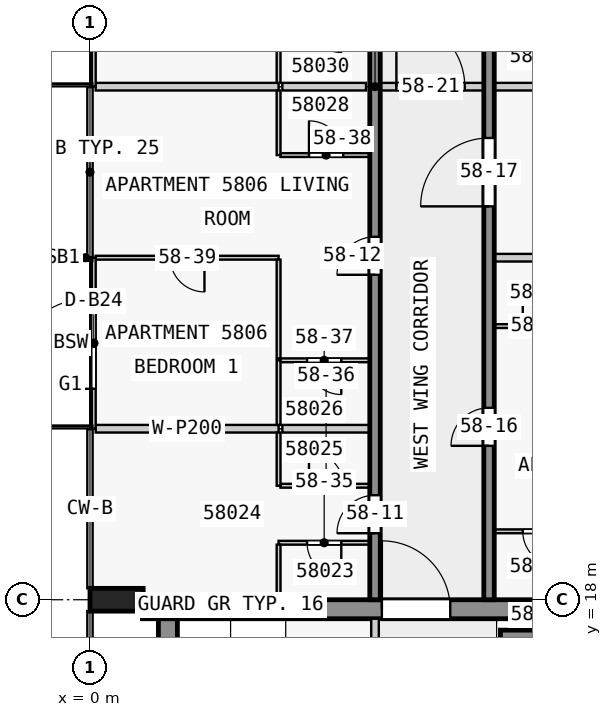
"""IFC4 building model, lengths in metres.
Left out: names, types, materials, properties, quantities, classifications, styles, units other than length and angle.
Written with IfcOpenShell. Run it as: python <this file> out.ifc"""

import sys

from ifc_helpers import new_model, si_unit, direction, frame, frame_2d, origin, origin_2d, place, context, subcontext, project, spatial, rectangle, extrude, element, fill, save


model = new_model("IFC4")
c1 = context("Model", 3, precision=1e-05, world=origin(), true_north=direction((0.0, 1.0)))
c2 = subcontext(c1, "Body", "Model", "MODEL_VIEW")
j1 = project(units=[si_unit("LENGTHUNIT", "METRE"), si_unit("PLANEANGLEUNIT", "RADIAN")], contexts=[c1])
p1 = place(None, origin())
s1 = spatial("IfcSite", under=j1, at=p1, CompositionType="ELEMENT")
p2 = place(p1, origin())
s2 = spatial("IfcBuilding", under=s1, at=p2, CompositionType="ELEMENT")
p3 = place(p2, frame((0.0, 0.0, 222.4)))
s3 = spatial("IfcBuildingStorey", under=s2, at=p3, CompositionType="ELEMENT", Elevation=222.4)
p4 = place(p3, frame((0.7, 18.0, 0.0), z_axis=(0.0, 0.0, 1.0), x_axis=(0.0, 1.0, 0.0)))
e1 = element("IfcColumn", 1, at=p4, inside=s3, PredefinedType="COLUMN", context=c2, shape_type="SweptSolid", body=[
    extrude(rectangle(XDim=0.6, YDim=1.4, at=origin_2d()), origin(), (0.0, 0.0, 1.0), 3.5),
])
p5 = place(p3, frame((1.38, 17.75, 0.0), z_axis=(0.0, 0.0, 1.0), x_axis=(1.0, 0.0, 0.0)))
e2 = element("IfcWall", 2, at=p5, inside=s3, PredefinedType="SHEAR", context=c2, shape_type="SweptSolid", body=[
    extrude(rectangle(XDim=21.12, YDim=0.5, at=frame_2d((10.56, 0.0))), origin(), (0.0, 0.0, 1.0), 3.25),
])
p6 = place(p5, frame((6.3, 0.0, 0.0)))
e3 = element("IfcOpeningElement", 3, at=p6, cuts=e2, PredefinedType="OPENING", context=c2, shape_type="SweptSolid", body=[
    extrude(rectangle(XDim=1.8, YDim=2.1, at=frame_2d((0.9, 1.05))), frame((0.0, 0.26, 0.0), z_axis=(0.0, -1.0, 0.0), x_axis=(1.0, 0.0, 0.0)), (0.0, 0.0, 1.0), 0.52),
])
p7 = place(p3, frame((2.05, 2.5, 0.0), z_axis=(0.0, 0.0, 1.0), x_axis=(0.0, 1.0, 0.0)))
e4 = element("IfcWall", 4, at=p7, inside=s3, PredefinedType="SHEAR", context=c2, shape_type="SweptSolid", body=[
    extrude(rectangle(XDim=15.0, YDim=0.5, at=frame_2d((7.5, 0.0))), origin(), (0.0, 0.0, 1.0), 3.25),
])
p8 = place(p3, frame((10.8, 17.05, 0.0), z_axis=(0.0, 0.0, 1.0), x_axis=(1.0, 0.0, 0.0)))
e5 = element("IfcWall", 5, at=p8, inside=s3, PredefinedType="SHEAR", context=c2, shape_type="SweptSolid", body=[
    extrude(rectangle(XDim=7.8, YDim=0.3, at=frame_2d((3.9, 0.0))), origin(), (0.0, 0.0, 1.0), 3.25),
])
p9 = place(p3, frame((7.5, 18.0, 0.0), z_axis=(0.0, 0.0, 1.0), x_axis=(0.0, 1.0, 0.0)))
e6 = element("IfcWall", 6, at=p9, inside=s3, PredefinedType="SHEAR", context=c2, shape_type="SweptSolid", body=[
    extrude(rectangle(XDim=27.0, YDim=0.275, at=frame_2d((13.5, 0.0))), origin(), (0.0, 0.0, 1.0), 3.25),
])
p10 = place(p9, frame((1.75, 0.0, 0.0)))
e7 = element("IfcOpeningElement", 7, at=p10, cuts=e6, PredefinedType="OPENING", context=c2, shape_type="SweptSolid", body=[
    extrude(rectangle(XDim=1.0, YDim=2.1, at=frame_2d((0.5, 1.05))), frame((0.0, 0.147, 0.0), z_axis=(0.0, -1.0, 0.0), x_axis=(1.0, 0.0, 0.0)), (0.0, 0.0, 1.0), 0.295),
])
p11 = place(p9, frame((8.55, 0.0, 0.0)))
e8 = element("IfcOpeningElement", 8, at=p11, cuts=e6, PredefinedType="OPENING", context=c2, shape_type="SweptSolid", body=[
    extrude(rectangle(XDim=1.0, YDim=2.1, at=frame_2d((0.5, 1.05))), frame((0.0, 0.147, 0.0), z_axis=(0.0, -1.0, 0.0), x_axis=(1.0, 0.0, 0.0)), (0.0, 0.0, 1.0), 0.295),
])
p12 = place(p9, frame((17.55, 0.0, 0.0)))
e9 = element("IfcOpeningElement", 9, at=p12, cuts=e6, PredefinedType="OPENING", context=c2, shape_type="SweptSolid", body=[
    extrude(rectangle(XDim=1.0, YDim=2.1, at=frame_2d((0.5, 1.05))), frame((0.0, 0.147, 0.0), z_axis=(0.0, -1.0, 0.0), x_axis=(1.0, 0.0, 0.0)), (0.0, 0.0, 1.0), 0.295),
])
p13 = place(p9, frame((23.25, 0.0, 0.0)))
e10 = element("IfcOpeningElement", 10, at=p13, cuts=e6, PredefinedType="OPENING", context=c2, shape_type="SweptSolid", body=[
    extrude(rectangle(XDim=0.9, YDim=2.1, at=frame_2d((0.45, 1.05))), frame((0.0, 0.147, 0.0), z_axis=(0.0, -1.0, 0.0), x_axis=(1.0, 0.0, 0.0)), (0.0, 0.0, 1.0), 0.295),
])
p14 = place(p9, frame((25.45, 0.0, 0.0)))
e11 = element("IfcOpeningElement", 11, at=p14, cuts=e6, PredefinedType="OPENING", context=c2, shape_type="SweptSolid", body=[
    extrude(rectangle(XDim=1.0, YDim=2.1, at=frame_2d((0.5, 1.05))), frame((0.0, 0.147, 0.0), z_axis=(0.0, -1.0, 0.0), x_axis=(1.0, 0.0, 0.0)), (0.0, 0.0, 1.0), 0.295),
])
p15 = place(p3, frame((10.5, 18.0, 0.0), z_axis=(0.0, 0.0, 1.0), x_axis=(0.0, 1.0, 0.0)))
e12 = element("IfcWall", 12, at=p15, inside=s3, PredefinedType="SHEAR", context=c2, shape_type="SweptSolid", body=[
    extrude(rectangle(XDim=27.0, YDim=0.275, at=frame_2d((13.5, 0.0))), origin(), (0.0, 0.0, 1.0), 3.25),
])
p16 = place(p15, frame((4.05, 0.0, 0.0)))
e13 = element("IfcOpeningElement", 13, at=p16, cuts=e12, PredefinedType="OPENING", context=c2, shape_type="SweptSolid", body=[
    extrude(rectangle(XDim=1.0, YDim=2.1, at=frame_2d((0.5, 1.05))), frame((0.0, 0.147, 0.0), z_axis=(0.0, -1.0, 0.0), x_axis=(1.0, 0.0, 0.0)), (0.0, 0.0, 1.0), 0.295),
])
p17 = place(p15, frame((10.35, 0.0, 0.0)))
e14 = element("IfcOpeningElement", 14, at=p17, cuts=e12, PredefinedType="OPENING", context=c2, shape_type="SweptSolid", body=[
    extrude(rectangle(XDim=1.8, YDim=2.1, at=frame_2d((0.9, 1.05))), frame((0.0, 0.147, 0.0), z_axis=(0.0, -1.0, 0.0), x_axis=(1.0, 0.0, 0.0)), (0.0, 0.0, 1.0), 0.295),
])
p18 = place(p15, frame((15.25, 0.0, 0.0)))
e15 = element("IfcOpeningElement", 15, at=p18, cuts=e12, PredefinedType="OPENING", context=c2, shape_type="SweptSolid", body=[
    extrude(rectangle(XDim=1.0, YDim=2.1, at=frame_2d((0.5, 1.05))), frame((0.0, 0.147, 0.0), z_axis=(0.0, -1.0, 0.0), x_axis=(1.0, 0.0, 0.0)), (0.0, 0.0, 1.0), 0.295),
])
p19 = place(p15, frame((21.35, 0.0, 0.0)))
e16 = element("IfcOpeningElement", 16, at=p19, cuts=e12, PredefinedType="OPENING", context=c2, shape_type="SweptSolid", body=[
    extrude(rectangle(XDim=1.0, YDim=2.1, at=frame_2d((0.5, 1.05))), frame((0.0, 0.147, 0.0), z_axis=(0.0, -1.0, 0.0), x_axis=(1.0, 0.0, 0.0)), (0.0, 0.0, 1.0), 0.295),
])
p20 = place(p3, frame((0.1, 22.5, 0.0), z_axis=(0.0, 0.0, 1.0), x_axis=(0.0, 1.0, 0.0)))
e17 = element("IfcWall", 17, at=p20, inside=s3, PredefinedType="STANDARD", context=c2, shape_type="SweptSolid", body=[
    extrude(rectangle(XDim=4.5, YDim=0.1, at=frame_2d((2.25, 0.0))), origin(), (0.0, 0.0, 1.0), 3.25),
])
p21 = place(p20, frame((1.05, 0.0, 0.0)))
e18 = element("IfcOpeningElement", 18, at=p21, cuts=e17, PredefinedType="OPENING", context=c2, shape_type="SweptSolid", body=[
    extrude(rectangle(XDim=2.4, YDim=2.4, at=frame_2d((1.2, 1.2))), frame((0.0, 0.06, 0.0), z_axis=(0.0, -1.0, 0.0), x_axis=(1.0, 0.0, 0.0)), (0.0, 0.0, 1.0), 0.12),
])
p22 = place(p3, frame((0.1, 31.5, 0.0), z_axis=(0.0, 0.0, 1.0), x_axis=(0.0, 1.0, 0.0)))
e19 = element("IfcWall", 19, at=p22, inside=s3, PredefinedType="STANDARD", context=c2, shape_type="SweptSolid", body=[
    extrude(rectangle(XDim=4.5, YDim=0.1, at=frame_2d((2.25, 0.0))), origin(), (0.0, 0.0, 1.0), 3.25),
])
p23 = place(p22, frame((1.05, 0.0, 0.0)))
e20 = element("IfcOpeningElement", 20, at=p23, cuts=e19, PredefinedType="OPENING", context=c2, shape_type="SweptSolid", body=[
    extrude(rectangle(XDim=2.4, YDim=2.4, at=frame_2d((1.2, 1.2))), frame((0.0, 0.06, 0.0), z_axis=(0.0, -1.0, 0.0), x_axis=(1.0, 0.0, 0.0)), (0.0, 0.0, 1.0), 0.12),
])
p24 = place(p3, frame((7.5, 10.1, 0.0), z_axis=(0.0, 0.0, 1.0), x_axis=(0.0, 1.0, 0.0)))
e21 = element("IfcWall", 21, at=p24, inside=s3, PredefinedType="PARTITIONING", context=c2, shape_type="SweptSolid", body=[
    extrude(rectangle(XDim=7.4, YDim=0.2, at=frame_2d((3.7, 0.0))), origin(), (0.0, 0.0, 1.0), 3.25),
])
p25 = place(p24, frame((0.75, 0.0, 0.0)))
e22 = element("IfcOpeningElement", 22, at=p25, cuts=e21, PredefinedType="OPENING", context=c2, shape_type="SweptSolid", body=[
    extrude(rectangle(XDim=0.9, YDim=2.1, at=frame_2d((0.45, 1.05))), frame((0.0, 0.11, 0.0), z_axis=(0.0, -1.0, 0.0), x_axis=(1.0, 0.0, 0.0)), (0.0, 0.0, 1.0), 0.22),
])
p26 = place(p24, frame((3.175, 0.0, 0.0)))
e23 = element("IfcOpeningElement", 23, at=p26, cuts=e21, PredefinedType="OPENING", context=c2, shape_type="SweptSolid", body=[
    extrude(rectangle(XDim=0.9, YDim=2.1, at=frame_2d((0.45, 1.05))), frame((0.0, 0.11, 0.0), z_axis=(0.0, -1.0, 0.0), x_axis=(1.0, 0.0, 0.0)), (0.0, 0.0, 1.0), 0.22),
])
p27 = place(p24, frame((5.25, 0.0, 0.0)))
e24 = element("IfcOpeningElement", 24, at=p27, cuts=e21, PredefinedType="OPENING", context=c2, shape_type="SweptSolid", body=[
    extrude(rectangle(XDim=0.9, YDim=2.1, at=frame_2d((0.45, 1.05))), frame((0.0, 0.11, 0.0), z_axis=(0.0, -1.0, 0.0), x_axis=(1.0, 0.0, 0.0)), (0.0, 0.0, 1.0), 0.22),
])
p28 = place(p3, frame((7.363, 19.5, 0.0), z_axis=(0.0, 0.0, 1.0), x_axis=(-1.0, 0.0, 0.0)))
e25 = element("IfcWall", 25, at=p28, inside=s3, PredefinedType="PARTITIONING", context=c2, shape_type="SweptSolid", body=[
    extrude(rectangle(XDim=2.4, YDim=0.1, at=frame_2d((1.2, 0.0))), origin(), (0.0, 0.0, 1.0), 3.25),
])
p29 = place(p28, frame((0.75, 0.0, 0.0)))
e26 = element("IfcOpeningElement", 26, at=p29, cuts=e25, PredefinedType="OPENING", context=c2, shape_type="SweptSolid", body=[
    extrude(rectangle(XDim=0.9, YDim=2.1, at=frame_2d((0.45, 1.05))), frame((0.0, 0.06, 0.0), z_axis=(0.0, -1.0, 0.0), x_axis=(1.0, 0.0, 0.0)), (0.0, 0.0, 1.0), 0.12),
])
p30 = place(p3, frame((13.038, 19.8, 0.0), z_axis=(0.0, 0.0, 1.0), x_axis=(-1.0, 0.0, 0.0)))
e27 = element("IfcWall", 27, at=p30, inside=s3, PredefinedType="PARTITIONING", context=c2, shape_type="SweptSolid", body=[
    extrude(rectangle(XDim=2.4, YDim=0.1, at=frame_2d((1.2, 0.0))), origin(), (0.0, 0.0, 1.0), 3.25),
])
p31 = place(p30, frame((0.75, 0.0, 0.0)))
e28 = element("IfcOpeningElement", 28, at=p31, cuts=e27, PredefinedType="OPENING", context=c2, shape_type="SweptSolid", body=[
    extrude(rectangle(XDim=0.9, YDim=2.1, at=frame_2d((0.45, 1.05))), frame((0.0, 0.06, 0.0), z_axis=(0.0, -1.0, 0.0), x_axis=(1.0, 0.0, 0.0)), (0.0, 0.0, 1.0), 0.12),
])
p32 = place(p3, frame((5.012, 21.0, 0.0), z_axis=(0.0, 0.0, 1.0), x_axis=(1.0, 0.0, 0.0)))
e29 = element("IfcWall", 29, at=p32, inside=s3, PredefinedType="PARTITIONING", context=c2, shape_type="SweptSolid", body=[
    extrude(rectangle(XDim=2.35, YDim=0.1, at=frame_2d((1.175, 0.0))), origin(), (0.0, 0.0, 1.0), 3.25),
])
p33 = place(p32, frame((0.75, 0.0, 0.0)))
e30 = element("IfcOpeningElement", 30, at=p33, cuts=e29, PredefinedType="OPENING", context=c2, shape_type="SweptSolid", body=[
    extrude(rectangle(XDim=0.9, YDim=2.1, at=frame_2d((0.45, 1.05))), frame((0.0, 0.06, 0.0), z_axis=(0.0, -1.0, 0.0), x_axis=(1.0, 0.0, 0.0)), (0.0, 0.0, 1.0), 0.12),
])
p34 = place(p3, frame((7.363, 22.5, 0.0), z_axis=(0.0, 0.0, 1.0), x_axis=(-1.0, 0.0, 0.0)))
e31 = element("IfcWall", 31, at=p34, inside=s3, PredefinedType="PARTITIONING", context=c2, shape_type="SweptSolid", body=[
    extrude(rectangle(XDim=2.3, YDim=0.2, at=frame_2d((1.15, 0.0))), origin(), (0.0, 0.0, 1.0), 3.25),
])
p35 = place(p3, frame((0.15, 22.5, 0.0), z_axis=(0.0, 0.0, 1.0), x_axis=(1.0, 0.0, 0.0)))
e32 = element("IfcWall", 32, at=p35, inside=s3, PredefinedType="PARTITIONING", context=c2, shape_type="SweptSolid", body=[
    extrude(rectangle(XDim=4.812, YDim=0.2, at=frame_2d((2.406, 0.0))), origin(), (0.0, 0.0, 1.0), 3.25),
])
p36 = place(p3, frame((7.363, 24.3, 0.0), z_axis=(0.0, 0.0, 1.0), x_axis=(-1.0, 0.0, 0.0)))
e33 = element("IfcWall", 33, at=p36, inside=s3, PredefinedType="PARTITIONING", context=c2, shape_type="SweptSolid", body=[
    extrude(rectangle(XDim=2.35, YDim=0.1, at=frame_2d((1.175, 0.0))), origin(), (0.0, 0.0, 1.0), 3.25),
])
p37 = place(p36, frame((0.75, 0.0, 0.0)))
e34 = element("IfcOpeningElement", 34, at=p37, cuts=e33, PredefinedType="OPENING", context=c2, shape_type="SweptSolid", body=[
    extrude(rectangle(XDim=0.9, YDim=2.1, at=frame_2d((0.45, 1.05))), frame((0.0, 0.06, 0.0), z_axis=(0.0, -1.0, 0.0), x_axis=(1.0, 0.0, 0.0)), (0.0, 0.0, 1.0), 0.12),
])
p38 = place(p3, frame((10.637, 25.2, 0.0), z_axis=(0.0, 0.0, 1.0), x_axis=(1.0, 0.0, 0.0)))
e35 = element("IfcWall", 35, at=p38, inside=s3, PredefinedType="PARTITIONING", context=c2, shape_type="SweptSolid", body=[
    extrude(rectangle(XDim=2.35, YDim=0.1, at=frame_2d((1.175, 0.0))), origin(), (0.0, 0.0, 1.0), 3.25),
])
p39 = place(p38, frame((0.75, 0.0, 0.0)))
e36 = element("IfcOpeningElement", 36, at=p39, cuts=e35, PredefinedType="OPENING", context=c2, shape_type="SweptSolid", body=[
    extrude(rectangle(XDim=0.9, YDim=2.1, at=frame_2d((0.45, 1.05))), frame((0.0, 0.06, 0.0), z_axis=(0.0, -1.0, 0.0), x_axis=(1.0, 0.0, 0.0)), (0.0, 0.0, 1.0), 0.12),
])
p40 = place(p3, frame((4.962, 27.0, 0.0), z_axis=(0.0, 0.0, 1.0), x_axis=(-1.0, 0.0, 0.0)))
e37 = element("IfcWall", 37, at=p40, inside=s3, PredefinedType="PARTITIONING", context=c2, shape_type="SweptSolid", body=[
    extrude(rectangle(XDim=4.812, YDim=0.1, at=frame_2d((2.406, 0.0))), origin(), (0.0, 0.0, 1.0), 3.25),
])
p41 = place(p40, frame((1.95, 0.0, 0.0)))
e38 = element("IfcOpeningElement", 38, at=p41, cuts=e37, PredefinedType="OPENING", context=c2, shape_type="SweptSolid", body=[
    extrude(rectangle(XDim=0.9, YDim=2.1, at=frame_2d((0.45, 1.05))), frame((0.0, 0.06, 0.0), z_axis=(0.0, -1.0, 0.0), x_axis=(1.0, 0.0, 0.0)), (0.0, 0.0, 1.0), 0.12),
])
p42 = place(p3, frame((17.85, 27.0, 0.0), z_axis=(0.0, 0.0, 1.0), x_axis=(-1.0, 0.0, 0.0)))
e39 = element("IfcWall", 39, at=p42, inside=s3, PredefinedType="PARTITIONING", context=c2, shape_type="SweptSolid", body=[
    extrude(rectangle(XDim=7.213, YDim=0.2, at=frame_2d((3.606, 0.0))), origin(), (0.0, 0.0, 1.0), 3.25),
])
p43 = place(p3, frame((5.012, 29.7, 0.0), z_axis=(0.0, 0.0, 1.0), x_axis=(1.0, 0.0, 0.0)))
e40 = element("IfcWall", 40, at=p43, inside=s3, PredefinedType="PARTITIONING", context=c2, shape_type="SweptSolid", body=[
    extrude(rectangle(XDim=2.35, YDim=0.1, at=frame_2d((1.175, 0.0))), origin(), (0.0, 0.0, 1.0), 3.25),
])
p44 = place(p43, frame((0.75, 0.0, 0.0)))
e41 = element("IfcOpeningElement", 41, at=p44, cuts=e40, PredefinedType="OPENING", context=c2, shape_type="SweptSolid", body=[
    extrude(rectangle(XDim=0.9, YDim=2.1, at=frame_2d((0.45, 1.05))), frame((0.0, 0.06, 0.0), z_axis=(0.0, -1.0, 0.0), x_axis=(1.0, 0.0, 0.0)), (0.0, 0.0, 1.0), 0.12),
])
p45 = place(p3, frame((7.262, 31.5, 0.0), z_axis=(0.0, 0.0, 1.0), x_axis=(-1.0, 0.0, 0.0)))
e42 = element("IfcWall", 42, at=p45, inside=s3, PredefinedType="PARTITIONING", context=c2, shape_type="SweptSolid", body=[
    extrude(rectangle(XDim=2.2, YDim=0.2, at=frame_2d((1.1, 0.0))), origin(), (0.0, 0.0, 1.0), 3.25),
])
p46 = place(p3, frame((17.85, 31.5, 0.0), z_axis=(0.0, 0.0, 1.0), x_axis=(-1.0, 0.0, 0.0)))
e43 = element("IfcWall", 43, at=p46, inside=s3, PredefinedType="PARTITIONING", context=c2, shape_type="SweptSolid", body=[
    extrude(rectangle(XDim=7.213, YDim=0.2, at=frame_2d((3.606, 0.0))), origin(), (0.0, 0.0, 1.0), 3.25),
])
p47 = place(p3, frame((0.15, 31.5, 0.0), z_axis=(0.0, 0.0, 1.0), x_axis=(1.0, 0.0, 0.0)))
e44 = element("IfcWall", 44, at=p47, inside=s3, PredefinedType="PARTITIONING", context=c2, shape_type="SweptSolid", body=[
    extrude(rectangle(XDim=4.812, YDim=0.2, at=frame_2d((2.406, 0.0))), origin(), (0.0, 0.0, 1.0), 3.25),
])
p48 = place(p3, frame((4.962, 19.45, 0.0), z_axis=(0.0, 0.0, 1.0), x_axis=(0.0, -1.0, 0.0)))
e45 = element("IfcWall", 45, at=p48, inside=s3, PredefinedType="PARTITIONING", context=c2, shape_type="SweptSolid", body=[
    extrude(rectangle(XDim=1.45, YDim=0.1, at=frame_2d((0.725, 0.0))), origin(), (0.0, 0.0, 1.0), 3.25),
])
p49 = place(p3, frame((4.962, 22.4, 0.0), z_axis=(0.0, 0.0, 1.0), x_axis=(0.0, -1.0, 0.0)))
e46 = element("IfcWall", 46, at=p49, inside=s3, PredefinedType="PARTITIONING", context=c2, shape_type="SweptSolid", body=[
    extrude(rectangle(XDim=1.4, YDim=0.1, at=frame_2d((0.7, 0.0))), origin(), (0.0, 0.0, 1.0), 3.25),
])
for number, where, z_axis, x_axis in (
    (47, (4.962, 24.3, 0.0), (0.0, 0.0, 1.0), (0.0, -1.0, 0.0)),
    (48, (4.962, 31.4, 0.0), (0.0, 0.0, 1.0), (0.0, -1.0, 0.0)),
    (49, (4.962, 33.3, 0.0), (0.0, 0.0, 1.0), (0.0, -1.0, 0.0)),
):
    element("IfcWall", number, at=place(p3, frame(where, z_axis=z_axis, x_axis=x_axis)), inside=s3, PredefinedType="PARTITIONING", context=c2, shape_type="SweptSolid", body=[
        extrude(rectangle(XDim=1.7, YDim=0.1, at=frame_2d((0.85, 0.0))), origin(), (0.0, 0.0, 1.0), 3.25),
    ])
p50 = place(p3, frame((4.962, 24.35, 0.0), z_axis=(0.0, 0.0, 1.0), x_axis=(0.0, 1.0, 0.0)))
e50 = element("IfcWall", 50, at=p50, inside=s3, PredefinedType="PARTITIONING", context=c2, shape_type="SweptSolid", body=[
    extrude(rectangle(XDim=2.6, YDim=0.1, at=frame_2d((1.3, 0.0))), origin(), (0.0, 0.0, 1.0), 3.25),
])
p51 = place(p3, frame((7.363, 31.5, 0.0), z_axis=(0.0, 0.0, 1.0), x_axis=(1.0, 0.0, 0.0)))
e51 = element("IfcWall", 51, at=p51, inside=s3, PredefinedType="PARTITIONING", context=c2, shape_type="SweptSolid", body=[
    extrude(rectangle(XDim=3.175, YDim=0.2, at=frame_2d((1.587, 0.0))), origin(), (0.0, 0.0, 1.0), 3.25),
])
p52 = place(p51, frame((0.7, 0.0, 0.0)))
e52 = element("IfcOpeningElement", 52, at=p52, cuts=e51, PredefinedType="OPENING", context=c2, shape_type="SweptSolid", body=[
    extrude(rectangle(XDim=1.8, YDim=2.1, at=frame_2d((0.9, 1.05))), frame((0.0, 0.11, 0.0), z_axis=(0.0, -1.0, 0.0), x_axis=(1.0, 0.0, 0.0)), (0.0, 0.0, 1.0), 0.22),
])
p53 = place(p21, origin())
e53 = element("IfcDoor", 53, at=p53, inside=s3, OperationType="SINGLE_SWING_LEFT", PredefinedType="DOOR", context=c2, shape_type="SweptSolid", body=[
    extrude(rectangle(XDim=2.4, YDim=2.4, at=frame_2d((1.2, 1.2))), frame((0.0, 0.025, 0.0), z_axis=(0.0, -1.0, 0.0), x_axis=(1.0, 0.0, 0.0)), (0.0, 0.0, 1.0), 0.05),
])
fill(e18, e53)
p54 = place(p6, origin())
e54 = element("IfcDoor", 54, at=p54, inside=s3, OperationType="DOUBLE_DOOR_SINGLE_SWING", PredefinedType="DOOR", context=c2, shape_type="SweptSolid", body=[
    extrude(rectangle(XDim=1.8, YDim=2.1, at=frame_2d((0.9, 1.05))), frame((0.0, 0.025, 0.0), z_axis=(0.0, -1.0, 0.0), x_axis=(1.0, 0.0, 0.0)), (0.0, 0.0, 1.0), 0.05),
])
fill(e3, e54)
p55 = place(p10, origin())
e55 = element("IfcDoor", 55, at=p55, inside=s3, OperationType="SINGLE_SWING_LEFT", PredefinedType="DOOR", context=c2, shape_type="SweptSolid", body=[
    extrude(rectangle(XDim=1.0, YDim=2.1, at=frame_2d((0.5, 1.05))), frame((0.0, 0.025, 0.0), z_axis=(0.0, -1.0, 0.0), x_axis=(1.0, 0.0, 0.0)), (0.0, 0.0, 1.0), 0.05),
])
fill(e7, e55)
p56 = place(p11, origin())
e56 = element("IfcDoor", 56, at=p56, inside=s3, OperationType="SINGLE_SWING_LEFT", PredefinedType="DOOR", context=c2, shape_type="SweptSolid", body=[
    extrude(rectangle(XDim=1.0, YDim=2.1, at=frame_2d((0.5, 1.05))), frame((0.0, 0.025, 0.0), z_axis=(0.0, -1.0, 0.0), x_axis=(1.0, 0.0, 0.0)), (0.0, 0.0, 1.0), 0.05),
])
fill(e8, e56)
p57 = place(p16, origin())
e57 = element("IfcDoor", 57, at=p57, inside=s3, OperationType="SINGLE_SWING_LEFT", PredefinedType="DOOR", context=c2, shape_type="SweptSolid", body=[
    extrude(rectangle(XDim=1.0, YDim=2.1, at=frame_2d((0.5, 1.05))), frame((0.0, 0.025, 0.0), z_axis=(0.0, -1.0, 0.0), x_axis=(1.0, 0.0, 0.0)), (0.0, 0.0, 1.0), 0.05),
])
fill(e13, e57)
p58 = place(p17, origin())
e58 = element("IfcDoor", 58, at=p58, inside=s3, OperationType="SINGLE_SWING_LEFT", PredefinedType="DOOR", context=c2, shape_type="SweptSolid", body=[
    extrude(rectangle(XDim=1.8, YDim=2.1, at=frame_2d((0.9, 1.05))), frame((0.0, 0.025, 0.0), z_axis=(0.0, -1.0, 0.0), x_axis=(1.0, 0.0, 0.0)), (0.0, 0.0, 1.0), 0.05),
])
fill(e14, e58)
p59 = place(p52, origin())
e59 = element("IfcDoor", 59, at=p59, inside=s3, OperationType="SINGLE_SWING_RIGHT", PredefinedType="DOOR", context=c2, shape_type="SweptSolid", body=[
    extrude(rectangle(XDim=1.8, YDim=2.1, at=frame_2d((0.9, 1.05))), frame((0.0, 0.025, 0.0), z_axis=(0.0, -1.0, 0.0), x_axis=(1.0, 0.0, 0.0)), (0.0, 0.0, 1.0), 0.05),
])
fill(e52, e59)
p60 = place(p29, origin())
e60 = element("IfcDoor", 60, at=p60, inside=s3, OperationType="SINGLE_SWING_RIGHT", PredefinedType="DOOR", context=c2, shape_type="SweptSolid", body=[
    extrude(rectangle(XDim=0.9, YDim=2.1, at=frame_2d((0.45, 1.05))), frame((0.0, 0.025, 0.0), z_axis=(0.0, -1.0, 0.0), x_axis=(1.0, 0.0, 0.0)), (0.0, 0.0, 1.0), 0.05),
])
fill(e26, e60)
p61 = place(p33, origin())
e61 = element("IfcDoor", 61, at=p61, inside=s3, OperationType="SINGLE_SWING_RIGHT", PredefinedType="DOOR", context=c2, shape_type="SweptSolid", body=[
    extrude(rectangle(XDim=0.9, YDim=2.1, at=frame_2d((0.45, 1.05))), frame((0.0, 0.025, 0.0), z_axis=(0.0, -1.0, 0.0), x_axis=(1.0, 0.0, 0.0)), (0.0, 0.0, 1.0), 0.05),
])
fill(e30, e61)
p62 = place(p37, origin())
e62 = element("IfcDoor", 62, at=p62, inside=s3, OperationType="SINGLE_SWING_RIGHT", PredefinedType="DOOR", context=c2, shape_type="SweptSolid", body=[
    extrude(rectangle(XDim=0.9, YDim=2.1, at=frame_2d((0.45, 1.05))), frame((0.0, 0.025, 0.0), z_axis=(0.0, -1.0, 0.0), x_axis=(1.0, 0.0, 0.0)), (0.0, 0.0, 1.0), 0.05),
])
fill(e34, e62)
p63 = place(p44, origin())
e63 = element("IfcDoor", 63, at=p63, inside=s3, OperationType="SINGLE_SWING_RIGHT", PredefinedType="DOOR", context=c2, shape_type="SweptSolid", body=[
    extrude(rectangle(XDim=0.9, YDim=2.1, at=frame_2d((0.45, 1.05))), frame((0.0, 0.025, 0.0), z_axis=(0.0, -1.0, 0.0), x_axis=(1.0, 0.0, 0.0)), (0.0, 0.0, 1.0), 0.05),
])
fill(e41, e63)
p64 = place(p41, origin())
e64 = element("IfcDoor", 64, at=p64, inside=s3, OperationType="SINGLE_SWING_LEFT", PredefinedType="DOOR", context=c2, shape_type="SweptSolid", body=[
    extrude(rectangle(XDim=0.9, YDim=2.1, at=frame_2d((0.45, 1.05))), frame((0.0, 0.025, 0.0), z_axis=(0.0, -1.0, 0.0), x_axis=(1.0, 0.0, 0.0)), (0.0, 0.0, 1.0), 0.05),
])
fill(e38, e64)
p65 = place(p31, origin())
e65 = element("IfcDoor", 65, at=p65, inside=s3, OperationType="SINGLE_SWING_LEFT", PredefinedType="DOOR", context=c2, shape_type="SweptSolid", body=[
    extrude(rectangle(XDim=0.9, YDim=2.1, at=frame_2d((0.45, 1.05))), frame((0.0, 0.025, 0.0), z_axis=(0.0, -1.0, 0.0), x_axis=(1.0, 0.0, 0.0)), (0.0, 0.0, 1.0), 0.05),
])
fill(e28, e65)
p66 = place(p39, origin())
e66 = element("IfcDoor", 66, at=p66, inside=s3, OperationType="SINGLE_SWING_RIGHT", PredefinedType="DOOR", context=c2, shape_type="SweptSolid", body=[
    extrude(rectangle(XDim=0.9, YDim=2.1, at=frame_2d((0.45, 1.05))), frame((0.0, 0.025, 0.0), z_axis=(0.0, -1.0, 0.0), x_axis=(1.0, 0.0, 0.0)), (0.0, 0.0, 1.0), 0.05),
])
fill(e36, e66)
save(model, sys.argv[1])
